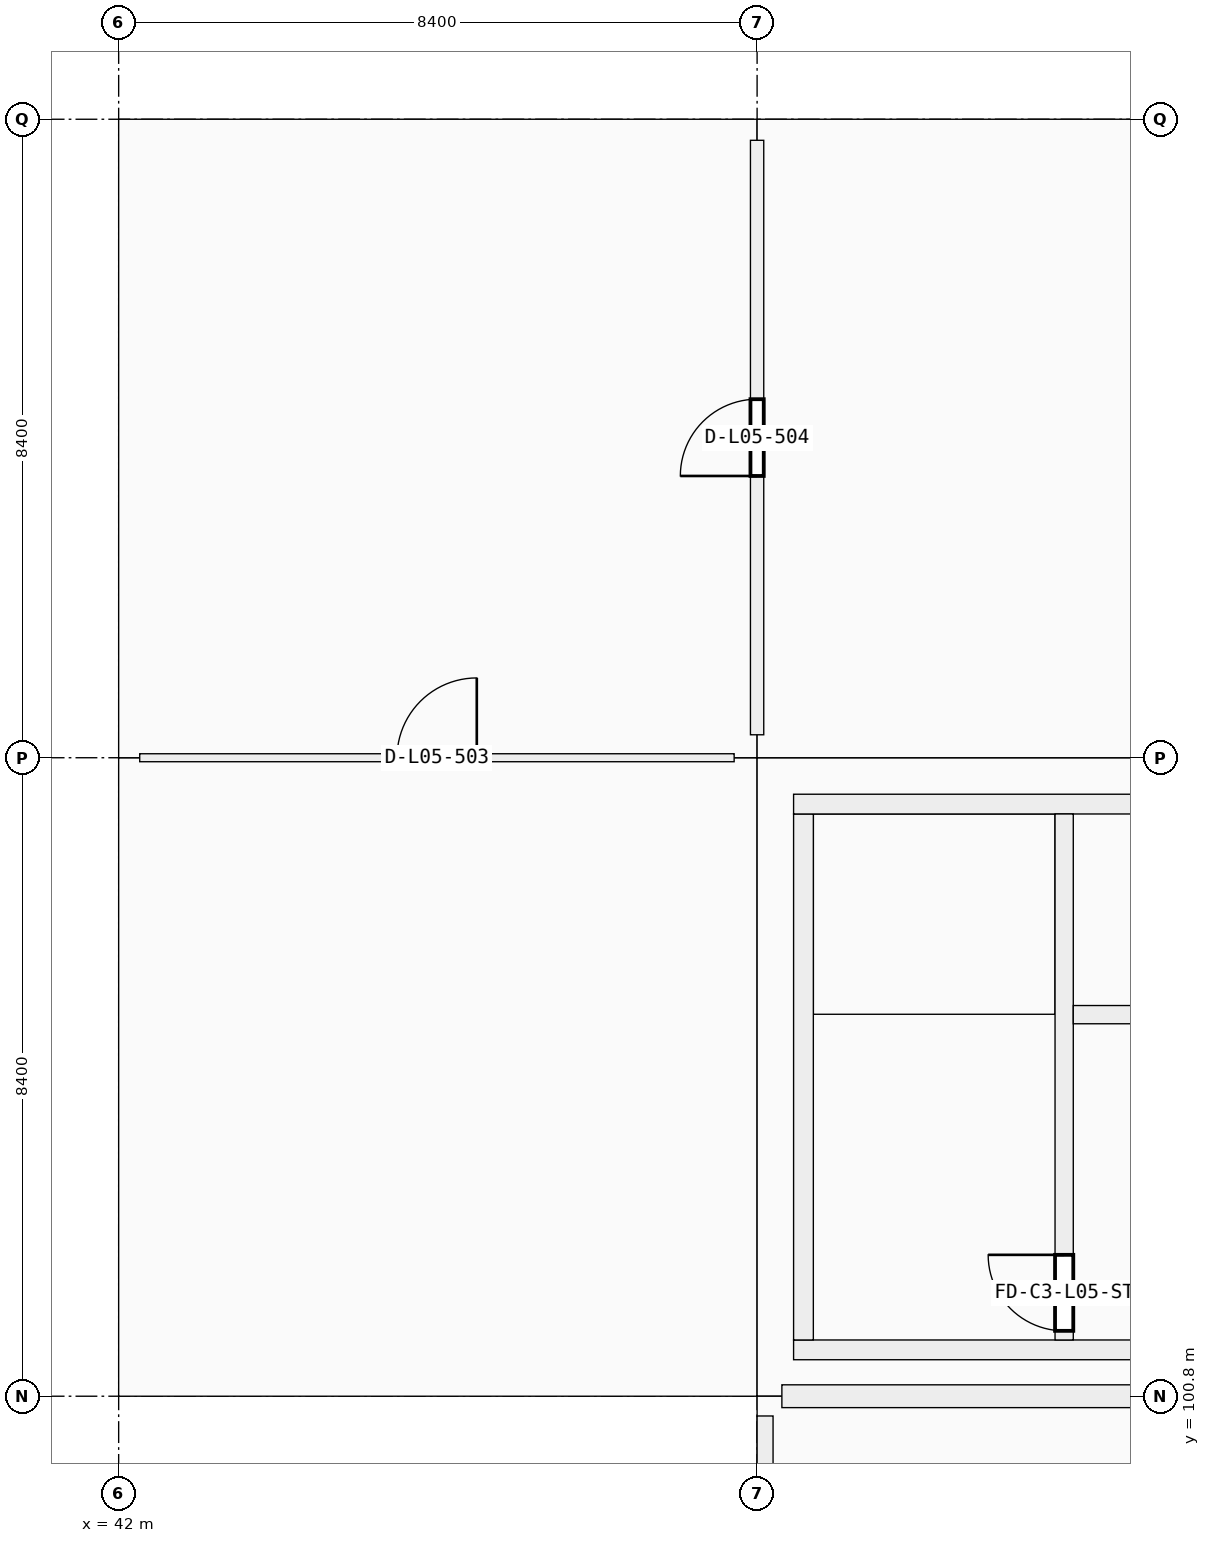
"""IFC4 building model, lengths in metres.
Left out: names, types, materials, properties, quantities, classifications, styles, units other than length and angle.
Written with IfcOpenShell. Run it as: python <this file> out.ifc"""

import sys

from ifc_helpers import new_model, si_unit, direction, frame, frame_2d, origin, origin_2d, place, context, subcontext, project, spatial, rectangle, extrude, element, fill, save


model = new_model("IFC4")
c1 = context("Model", 3, precision=1e-05, world=origin(), true_north=direction((0.0, 1.0)))
c2 = subcontext(c1, "Body", "Model", "MODEL_VIEW")
j1 = project(units=[si_unit("LENGTHUNIT", "METRE"), si_unit("PLANEANGLEUNIT", "RADIAN")], contexts=[c1])
p1 = place(None, origin())
s1 = spatial("IfcSite", under=j1, at=p1, CompositionType="ELEMENT")
p2 = place(p1, origin())
s2 = spatial("IfcBuilding", under=s1, at=p2, CompositionType="ELEMENT")
p3 = place(p2, frame((0.0, 0.0, 23.4)))
s3 = spatial("IfcBuildingStorey", under=s2, at=p3, CompositionType="ELEMENT", Elevation=23.4)
for number, where, z_axis, x_axis in (
    (1, (42.0, 100.8, 0.0), (0.0, 0.0, 1.0), (1.0, 0.0, 0.0)),
    (2, (42.0, 109.2, 0.0), (0.0, 0.0, 1.0), (1.0, 0.0, 0.0)),
    (3, (42.0, 117.6, 0.0), (0.0, 0.0, 1.0), (1.0, 0.0, 0.0)),
):
    element("IfcColumn", number, at=place(p3, frame(where, z_axis=z_axis, x_axis=x_axis)), inside=s3, PredefinedType="COLUMN", context=c2, shape_type="SweptSolid", body=[
        extrude(rectangle(XDim=0.55, YDim=0.55, at=origin_2d()), origin(), (0.0, 0.0, 1.0), 4.07),
    ])
p4 = place(p3, frame((50.4, 100.8, 0.0), z_axis=(0.0, 0.0, 1.0), x_axis=(1.0, 0.0, 0.0)))
e4 = element("IfcColumn", 4, at=p4, inside=s3, PredefinedType="COLUMN", context=c2, shape_type="SweptSolid", body=[
    extrude(rectangle(XDim=0.65, YDim=0.65, at=origin_2d()), origin(), (0.0, 0.0, 1.0), 4.32),
])
p5 = place(p3, frame((50.4, 109.2, 0.0), z_axis=(0.0, 0.0, 1.0), x_axis=(1.0, 0.0, 0.0)))
e5 = element("IfcColumn", 5, at=p5, inside=s3, PredefinedType="COLUMN", context=c2, shape_type="SweptSolid", body=[
    extrude(rectangle(XDim=0.6, YDim=0.6, at=origin_2d()), origin(), (0.0, 0.0, 1.0), 4.32),
])
p6 = place(p3, frame((50.4, 117.6, 0.0), z_axis=(0.0, 0.0, 1.0), x_axis=(1.0, 0.0, 0.0)))
e6 = element("IfcColumn", 6, at=p6, inside=s3, PredefinedType="COLUMN", context=c2, shape_type="SweptSolid", body=[
    extrude(rectangle(XDim=0.55, YDim=0.55, at=origin_2d()), origin(), (0.0, 0.0, 1.0), 4.07),
])
p7 = place(p3, frame((58.499, 100.8, 0.0), z_axis=(0.0, 0.0, 1.0), x_axis=(-1.0, 0.0, 0.0)))
e7 = element("IfcWall", 7, at=p7, inside=s3, PredefinedType="SOLIDWALL", context=c2, shape_type="SweptSolid", body=[
    extrude(rectangle(XDim=7.773, YDim=0.3, at=frame_2d((3.886, 0.0))), origin(), (0.0, 0.0, 1.0), 3.37),
])
p8 = place(p3, frame((50.505, 92.66, 0.0), z_axis=(0.0, 0.0, 1.0), x_axis=(0.0, 1.0, 0.0)))
e8 = element("IfcWall", 8, at=p8, inside=s3, PredefinedType="PARAPET", context=c2, shape_type="SweptSolid", body=[
    extrude(rectangle(XDim=7.88, YDim=0.21, at=frame_2d((3.94, 0.0))), origin(), (0.0, 0.0, 1.0), 0.95),
])
p9 = place(p3, frame((58.32, 101.41, 0.0), z_axis=(0.0, 0.0, 1.0), x_axis=(-1.0, 0.0, 0.0)))
e9 = element("IfcWall", 9, at=p9, inside=s3, PredefinedType="SHEAR", context=c2, shape_type="SweptSolid", body=[
    extrude(rectangle(XDim=7.44, YDim=0.26, at=frame_2d((3.72, 0.0))), origin(), (0.0, 0.0, 1.0), 4.32),
])
p10 = place(p3, frame((51.01, 101.54, 0.0), z_axis=(0.0, 0.0, 1.0), x_axis=(0.0, 1.0, 0.0)))
e10 = element("IfcWall", 10, at=p10, inside=s3, PredefinedType="SHEAR", context=c2, shape_type="SweptSolid", body=[
    extrude(rectangle(XDim=6.92, YDim=0.26, at=frame_2d((3.46, 0.0))), origin(), (0.0, 0.0, 1.0), 4.32),
])
p11 = place(p3, frame((50.88, 108.59, 0.0), z_axis=(0.0, 0.0, 1.0), x_axis=(1.0, 0.0, 0.0)))
e11 = element("IfcWall", 11, at=p11, inside=s3, PredefinedType="SHEAR", context=c2, shape_type="SweptSolid", body=[
    extrude(rectangle(XDim=7.44, YDim=0.26, at=frame_2d((3.72, 0.0))), origin(), (0.0, 0.0, 1.0), 4.32),
])
p12 = place(p3, frame((54.44, 101.54, 0.0), z_axis=(0.0, 0.0, 1.0), x_axis=(0.0, 1.0, 0.0)))
e12 = element("IfcWall", 12, at=p12, inside=s3, PredefinedType="SHEAR", context=c2, shape_type="SweptSolid", body=[
    extrude(rectangle(XDim=6.92, YDim=0.24, at=frame_2d((3.46, 0.0))), origin(), (0.0, 0.0, 1.0), 4.32),
])
p13 = place(p12, frame((0.12, 0.0, 0.0)))
e13 = element("IfcOpeningElement", 13, at=p13, cuts=e12, PredefinedType="OPENING", context=c2, shape_type="SweptSolid", body=[
    extrude(rectangle(XDim=1.0, YDim=2.15, at=frame_2d((0.5, 1.075))), frame((0.0, 0.12, 0.0), z_axis=(0.0, -1.0, 0.0), x_axis=(1.0, 0.0, 0.0)), (0.0, 0.0, 1.0), 0.24),
])
p14 = place(p3, frame((54.56, 105.82, 0.0), z_axis=(0.0, 0.0, 1.0), x_axis=(1.0, 0.0, 0.0)))
e14 = element("IfcWall", 14, at=p14, inside=s3, PredefinedType="SHEAR", context=c2, shape_type="SweptSolid", body=[
    extrude(rectangle(XDim=3.5, YDim=0.24, at=frame_2d((1.75, 0.0))), origin(), (0.0, 0.0, 1.0), 4.32),
])
p15 = place(p14, frame((1.15, 0.0, 0.0)))
e15 = element("IfcOpeningElement", 15, at=p15, cuts=e14, PredefinedType="OPENING", context=c2, shape_type="SweptSolid", body=[
    extrude(rectangle(XDim=1.2, YDim=2.2, at=frame_2d((0.6, 1.1))), frame((0.0, 0.12, 0.0), z_axis=(0.0, -1.0, 0.0), x_axis=(1.0, 0.0, 0.0)), (0.0, 0.0, 1.0), 0.24),
])
p16 = place(p3, frame((42.277, 109.2, 0.0), z_axis=(0.0, 0.0, 1.0), x_axis=(1.0, 0.0, 0.0)))
e16 = element("IfcWall", 16, at=p16, inside=s3, PredefinedType="PARTITIONING", context=c2, shape_type="SweptSolid", body=[
    extrude(rectangle(XDim=7.821, YDim=0.105, at=frame_2d((3.91, 0.0))), origin(), (0.0, 0.0, 1.0), 3.19),
])
p17 = place(p16, frame((3.385, 0.0, 0.0)))
e17 = element("IfcOpeningElement", 17, at=p17, cuts=e16, PredefinedType="OPENING", context=c2, shape_type="SweptSolid", body=[
    extrude(rectangle(XDim=1.05, YDim=2.12, at=frame_2d((0.525, 1.06))), frame((0.0, 0.052, 0.0), z_axis=(0.0, -1.0, 0.0), x_axis=(1.0, 0.0, 0.0)), (0.0, 0.0, 1.0), 0.105),
])
p18 = place(p3, frame((50.4, 109.502, 0.0), z_axis=(0.0, 0.0, 1.0), x_axis=(0.0, 1.0, 0.0)))
e18 = element("IfcWall", 18, at=p18, inside=s3, PredefinedType="PARTITIONING", context=c2, shape_type="SweptSolid", body=[
    extrude(rectangle(XDim=7.821, YDim=0.175, at=frame_2d((3.911, 0.0))), origin(), (0.0, 0.0, 1.0), 3.19),
])
p19 = place(p18, frame((3.405, 0.0, 0.0)))
e19 = element("IfcOpeningElement", 19, at=p19, cuts=e18, PredefinedType="OPENING", context=c2, shape_type="SweptSolid", body=[
    extrude(rectangle(XDim=1.01, YDim=2.12, at=frame_2d((0.505, 1.06))), frame((0.0, 0.087, 0.0), z_axis=(0.0, -1.0, 0.0), x_axis=(1.0, 0.0, 0.0)), (0.0, 0.0, 1.0), 0.175),
])
p20 = place(p13, origin())
e20 = element("IfcDoor", 20, at=p20, inside=s3, OperationType="SINGLE_SWING_RIGHT", PredefinedType="DOOR", context=c2, shape_type="SweptSolid", body=[
    extrude(rectangle(XDim=1.0, YDim=2.15, at=frame_2d((0.5, 1.075))), frame((0.0, 0.025, 0.0), z_axis=(0.0, -1.0, 0.0), x_axis=(1.0, 0.0, 0.0)), (0.0, 0.0, 1.0), 0.05),
])
fill(e13, e20)
p21 = place(p17, origin())
e21 = element("IfcDoor", 21, at=p21, inside=s3, OperationType="SINGLE_SWING_RIGHT", PredefinedType="DOOR", context=c2, shape_type="SweptSolid", body=[
    extrude(rectangle(XDim=1.05, YDim=2.12, at=frame_2d((0.525, 1.06))), frame((0.0, 0.025, 0.0), z_axis=(0.0, -1.0, 0.0), x_axis=(1.0, 0.0, 0.0)), (0.0, 0.0, 1.0), 0.05),
])
fill(e17, e21)
p22 = place(p19, origin())
e22 = element("IfcDoor", 22, at=p22, inside=s3, OperationType="SINGLE_SWING_LEFT", PredefinedType="DOOR", context=c2, shape_type="SweptSolid", body=[
    extrude(rectangle(XDim=1.01, YDim=2.12, at=frame_2d((0.505, 1.06))), frame((0.0, 0.025, 0.0), z_axis=(0.0, -1.0, 0.0), x_axis=(1.0, 0.0, 0.0)), (0.0, 0.0, 1.0), 0.05),
])
fill(e19, e22)
save(model, sys.argv[1])
